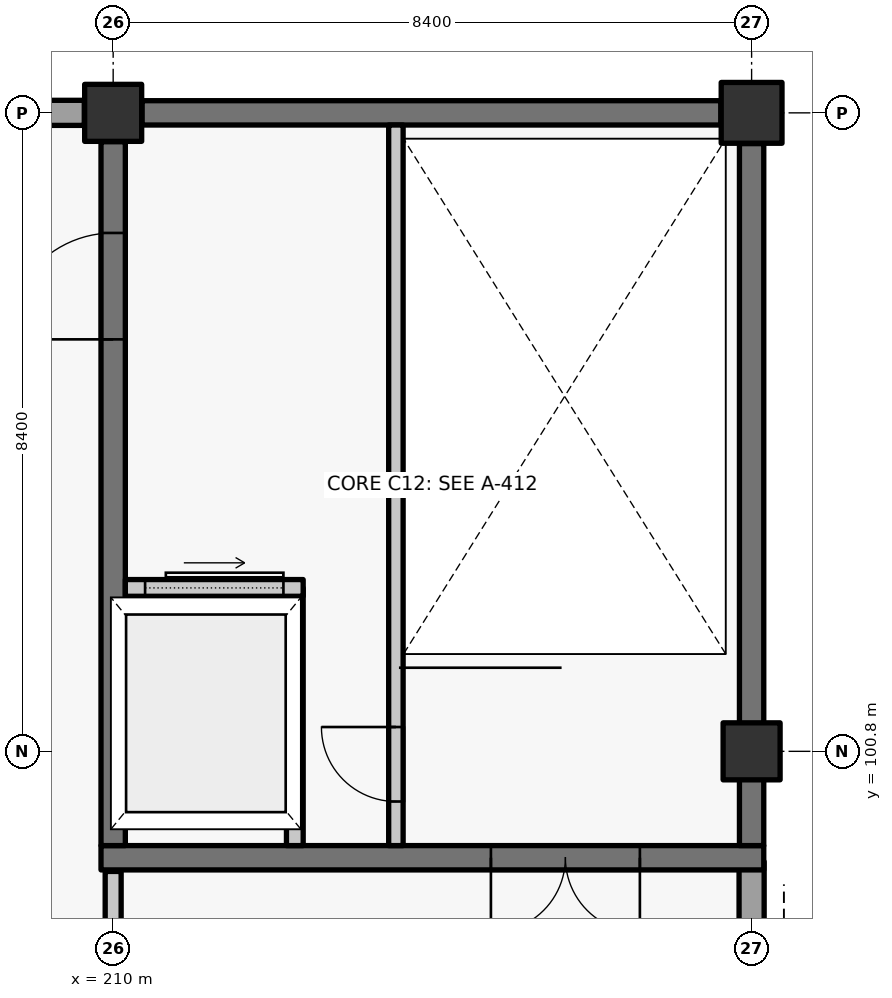
"""IFC4 building model, lengths in metres.
Left out: names, types, materials, properties, quantities, classifications, styles, units other than length and angle.
Written with IfcOpenShell. Run it as: python <this file> out.ifc"""

import sys

from ifc_helpers import new_model, si_unit, direction, frame, frame_2d, origin, origin_2d, place, context, subcontext, project, spatial, rectangle, extrude, element, fill, save


model = new_model("IFC4")
c1 = context("Model", 3, precision=1e-05, world=origin(), true_north=direction((0.0, 1.0)))
c2 = subcontext(c1, "Body", "Model", "MODEL_VIEW")
j1 = project(units=[si_unit("LENGTHUNIT", "METRE"), si_unit("PLANEANGLEUNIT", "RADIAN")], contexts=[c1])
p1 = place(None, origin())
s1 = spatial("IfcSite", under=j1, at=p1, CompositionType="ELEMENT")
p2 = place(p1, origin())
s2 = spatial("IfcBuilding", under=s1, at=p2, CompositionType="ELEMENT")
p3 = place(p2, frame((0.0, 0.0, 6.0)))
s3 = spatial("IfcBuildingStorey", under=s2, at=p3, CompositionType="ELEMENT", Elevation=6.0)
for number, where, z_axis, x_axis in (
    (1, (210.0, 109.2, 0.0), (0.0, 0.0, 1.0), (1.0, 0.0, 0.0)),
    (2, (218.4, 100.8, 0.0), (0.0, 0.0, 1.0), (1.0, 0.0, 0.0)),
):
    element("IfcColumn", number, at=place(p3, frame(where, z_axis=z_axis, x_axis=x_axis)), inside=s3, PredefinedType="COLUMN", context=c2, shape_type="SweptSolid", body=[
        extrude(rectangle(XDim=0.75, YDim=0.75, at=origin_2d()), origin(), (0.0, 0.0, 1.0), 5.4),
    ])
p4 = place(p3, frame((218.4, 109.2, 0.0), z_axis=(0.0, 0.0, 1.0), x_axis=(1.0, 0.0, 0.0)))
e3 = element("IfcColumn", 3, at=p4, inside=s3, PredefinedType="COLUMN", context=c2, shape_type="SweptSolid", body=[
    extrude(rectangle(XDim=0.8, YDim=0.8, at=origin_2d()), origin(), (0.0, 0.0, 1.0), 5.4),
])
p5 = place(p3, frame((218.4, 99.35, 0.0), z_axis=(0.0, 0.0, 1.0), x_axis=(0.0, -1.0, 0.0)))
e4 = element("IfcWall", 4, at=p5, inside=s3, PredefinedType="SOLIDWALL", context=c2, shape_type="SweptSolid", body=[
    extrude(rectangle(XDim=6.57, YDim=0.33, at=frame_2d((3.285, 0.0))), origin(), (0.0, 0.0, 1.0), 5.13),
])
p6 = place(p5, frame((1.835, 0.0, 1.5)))
e5 = element("IfcOpeningElement", 5, at=p6, cuts=e4, PredefinedType="OPENING", context=c2, shape_type="SweptSolid", body=[
    extrude(rectangle(XDim=2.8, YDim=1.15, at=frame_2d((1.4, 0.575))), frame((0.0, 0.175, 0.0), z_axis=(0.0, -1.0, 0.0), x_axis=(1.0, 0.0, 0.0)), (0.0, 0.0, 1.0), 0.35),
])
p7 = place(p3, frame((201.98, 109.2, 0.0), z_axis=(0.0, 0.0, 1.0), x_axis=(1.0, 0.0, 0.0)))
e6 = element("IfcWall", 6, at=p7, inside=s3, PredefinedType="SOLIDWALL", context=c2, shape_type="SweptSolid", body=[
    extrude(rectangle(XDim=7.64, YDim=0.33, at=frame_2d((3.82, 0.0))), origin(), (0.0, 0.0, 1.0), 5.13),
])
p8 = place(p7, frame((2.12, 0.0, 1.4)))
e7 = element("IfcOpeningElement", 7, at=p8, cuts=e6, PredefinedType="OPENING", context=c2, shape_type="SweptSolid", body=[
    extrude(rectangle(XDim=3.4, YDim=1.4, at=frame_2d((1.7, 0.7))), frame((0.0, 0.175, 0.0), z_axis=(0.0, -1.0, 0.0), x_axis=(1.0, 0.0, 0.0)), (0.0, 0.0, 1.0), 0.35),
])
p9 = place(p3, frame((218.56, 99.4, 0.0), z_axis=(0.0, 0.0, 1.0), x_axis=(-1.0, 0.0, 0.0)))
e8 = element("IfcWall", 8, at=p9, inside=s3, PredefinedType="SHEAR", context=c2, shape_type="SweptSolid", body=[
    extrude(rectangle(XDim=8.72, YDim=0.32, at=frame_2d((4.36, 0.0))), origin(), (0.0, 0.0, 1.0), 5.12),
])
p10 = place(p9, frame((1.63, 0.0, 0.0)))
e9 = element("IfcOpeningElement", 9, at=p10, cuts=e8, PredefinedType="OPENING", context=c2, shape_type="SweptSolid", body=[
    extrude(rectangle(XDim=1.96, YDim=2.2, at=frame_2d((0.98, 1.1))), frame((0.0, 0.17, 0.0), z_axis=(0.0, -1.0, 0.0), x_axis=(1.0, 0.0, 0.0)), (0.0, 0.0, 1.0), 0.34),
])
p11 = place(p3, frame((210.0, 99.56, 0.0), z_axis=(0.0, 0.0, 1.0), x_axis=(0.0, 1.0, 0.0)))
e10 = element("IfcWall", 10, at=p11, inside=s3, PredefinedType="SHEAR", context=c2, shape_type="SweptSolid", body=[
    extrude(rectangle(XDim=9.26, YDim=0.32, at=frame_2d((4.63, 0.0))), origin(), (0.0, 0.0, 1.0), 5.12),
])
p12 = place(p11, frame((6.66, 0.0, 0.0)))
e11 = element("IfcOpeningElement", 11, at=p12, cuts=e10, PredefinedType="OPENING", context=c2, shape_type="SweptSolid", body=[
    extrude(rectangle(XDim=1.4, YDim=2.2, at=frame_2d((0.7, 1.1))), frame((0.0, 0.17, 0.0), z_axis=(0.0, -1.0, 0.0), x_axis=(1.0, 0.0, 0.0)), (0.0, 0.0, 1.0), 0.34),
])
p13 = place(p3, frame((210.38, 109.2, 0.0), z_axis=(0.0, 0.0, 1.0), x_axis=(1.0, 0.0, 0.0)))
e12 = element("IfcWall", 12, at=p13, inside=s3, PredefinedType="SHEAR", context=c2, shape_type="SweptSolid", body=[
    extrude(rectangle(XDim=7.615, YDim=0.32, at=frame_2d((3.808, 0.0))), origin(), (0.0, 0.0, 1.0), 5.12),
])
p14 = place(p3, frame((218.4, 108.795, 0.0), z_axis=(0.0, 0.0, 1.0), x_axis=(0.0, -1.0, 0.0)))
e13 = element("IfcWall", 13, at=p14, inside=s3, PredefinedType="SHEAR", context=c2, shape_type="SweptSolid", body=[
    extrude(rectangle(XDim=9.235, YDim=0.32, at=frame_2d((4.617, 0.0))), origin(), (0.0, 0.0, 1.0), 5.12),
])
p15 = place(p3, frame((213.72, 99.56, 0.0), z_axis=(0.0, 0.0, 1.0), x_axis=(0.0, 1.0, 0.0)))
e14 = element("IfcWall", 14, at=p15, inside=s3, PredefinedType="SOLIDWALL", context=c2, shape_type="SweptSolid", body=[
    extrude(rectangle(XDim=9.48, YDim=0.19, at=frame_2d((4.74, 0.0))), origin(), (0.0, 0.0, 1.0), 5.12),
])
p16 = place(p15, frame((0.58, 0.0, 0.0)))
e15 = element("IfcOpeningElement", 15, at=p16, cuts=e14, PredefinedType="OPENING", context=c2, shape_type="SweptSolid", body=[
    extrude(rectangle(XDim=0.98, YDim=2.15, at=frame_2d((0.49, 1.075))), frame((0.0, 0.105, 0.0), z_axis=(0.0, -1.0, 0.0), x_axis=(1.0, 0.0, 0.0)), (0.0, 0.0, 1.0), 0.21),
])
p17 = place(p3, frame((212.39, 99.56, 0.0), z_axis=(0.0, 0.0, 1.0), x_axis=(0.0, 1.0, 0.0)))
e16 = element("IfcWall", 16, at=p17, inside=s3, PredefinedType="SOLIDWALL", context=c2, shape_type="SweptSolid", body=[
    extrude(rectangle(XDim=3.39, YDim=0.22, at=frame_2d((1.695, 0.0))), origin(), (0.0, 0.0, 1.0), 5.12),
])
p18 = place(p3, frame((210.16, 102.95, 0.0), z_axis=(0.0, 0.0, 1.0), x_axis=(1.0, 0.0, 0.0)))
e17 = element("IfcWall", 17, at=p18, inside=s3, PredefinedType="SOLIDWALL", context=c2, shape_type="SweptSolid", body=[
    extrude(rectangle(XDim=2.34, YDim=0.22, at=frame_2d((1.17, 0.0))), origin(), (0.0, 0.0, 1.0), 5.12),
])
p19 = place(p18, frame((0.26, 0.0, 0.0)))
e18 = element("IfcOpeningElement", 18, at=p19, cuts=e17, PredefinedType="OPENING", context=c2, shape_type="SweptSolid", body=[
    extrude(rectangle(XDim=1.82, YDim=2.4, at=frame_2d((0.91, 1.2))), frame((0.0, 0.12, 0.0), z_axis=(0.0, -1.0, 0.0), x_axis=(1.0, 0.0, 0.0)), (0.0, 0.0, 1.0), 0.24),
])
p20 = place(p3, frame((210.0, 92.85, 0.0), z_axis=(0.0, 0.0, 1.0), x_axis=(0.0, 1.0, 0.0)))
e19 = element("IfcWall", 19, at=p20, inside=s3, PredefinedType="PARTITIONING", context=c2, shape_type="SweptSolid", body=[
    extrude(rectangle(XDim=6.37, YDim=0.21, at=frame_2d((3.185, 0.0))), origin(), (0.0, 0.0, 1.0), 5.13),
])
p21 = place(p16, origin())
e20 = element("IfcDoor", 20, at=p21, inside=s3, OperationType="SINGLE_SWING_RIGHT", PredefinedType="DOOR", context=c2, shape_type="SweptSolid", body=[
    extrude(rectangle(XDim=0.98, YDim=2.15, at=frame_2d((0.49, 1.075))), frame((0.0, 0.025, 0.0), z_axis=(0.0, -1.0, 0.0), x_axis=(1.0, 0.0, 0.0)), (0.0, 0.0, 1.0), 0.05),
])
fill(e15, e20)
p22 = place(p10, origin())
e21 = element("IfcDoor", 21, at=p22, inside=s3, OperationType="DOUBLE_DOOR_SINGLE_SWING", PredefinedType="DOOR", context=c2, shape_type="SweptSolid", body=[
    extrude(rectangle(XDim=1.96, YDim=2.2, at=frame_2d((0.98, 1.1))), frame((0.0, 0.025, 0.0), z_axis=(0.0, -1.0, 0.0), x_axis=(1.0, 0.0, 0.0)), (0.0, 0.0, 1.0), 0.05),
])
fill(e9, e21)
p23 = place(p12, origin())
e22 = element("IfcDoor", 22, at=p23, inside=s3, OperationType="SINGLE_SWING_LEFT", PredefinedType="DOOR", context=c2, shape_type="SweptSolid", body=[
    extrude(rectangle(XDim=1.4, YDim=2.2, at=frame_2d((0.7, 1.1))), frame((0.0, 0.025, 0.0), z_axis=(0.0, -1.0, 0.0), x_axis=(1.0, 0.0, 0.0)), (0.0, 0.0, 1.0), 0.05),
])
fill(e11, e22)
p24 = place(p19, origin())
e23 = element("IfcDoor", 23, at=p24, inside=s3, OperationType="SLIDING_TO_RIGHT", PredefinedType="DOOR", context=c2, shape_type="SweptSolid", body=[
    extrude(rectangle(XDim=1.82, YDim=2.4, at=frame_2d((0.91, 1.2))), frame((0.0, 0.025, 0.0), z_axis=(0.0, -1.0, 0.0), x_axis=(1.0, 0.0, 0.0)), (0.0, 0.0, 1.0), 0.05),
])
fill(e18, e23)
save(model, sys.argv[1])
